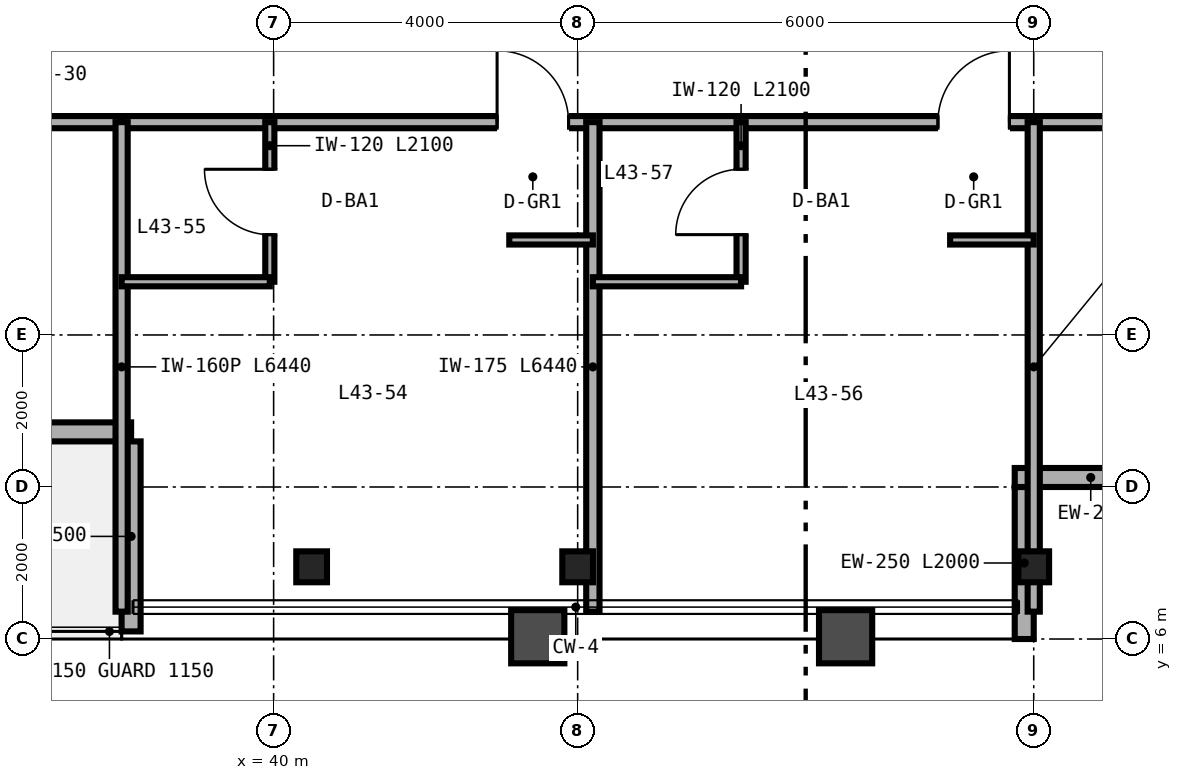
"""IFC4 building model, lengths in metres.
Left out: names, types, materials, properties, quantities, classifications, styles, units other than length and angle.
Written with IfcOpenShell. Run it as: python <this file> out.ifc"""

import sys

from ifc_helpers import new_model, si_unit, direction, frame, frame_2d, origin, origin_2d, place, context, subcontext, project, spatial, rectangle, i_section, extrude, source, transform, mapped, element, fill, save


model = new_model("IFC4")
c1 = context("Model", 3, precision=1e-05, world=origin(), true_north=direction((0.0, 1.0)))
c2 = subcontext(c1, "Body", "Model", "MODEL_VIEW")
j1 = project(units=[si_unit("LENGTHUNIT", "METRE"), si_unit("PLANEANGLEUNIT", "RADIAN")], contexts=[c1])
p1 = place(None, origin())
s1 = spatial("IfcSite", under=j1, at=p1, CompositionType="ELEMENT")
p2 = place(p1, origin())
s2 = spatial("IfcBuilding", under=s1, at=p2, CompositionType="ELEMENT")
p3 = place(p2, frame((0.0, 0.0, 174.0)))
s3 = spatial("IfcBuildingStorey", under=s2, at=p3, CompositionType="ELEMENT", Elevation=174.0)
m1 = source(origin(), c2, "Body", "SweptSolid", [
    extrude(i_section(OverallWidth=0.404, OverallDepth=0.407, WebThickness=0.027, FlangeThickness=0.044, FilletRadius=0.025, at=origin_2d()), origin(), (0.0, 0.0, 1.0), 3.37),
])
for number, where, z_axis, x_axis in (
    (1, (40.5, 6.95, 0.0), (0.0, 0.0, 1.0), (1.0, 0.0, 0.0)),
    (2, (44.0, 6.95, 0.0), (0.0, 0.0, 1.0), (1.0, 0.0, 0.0)),
    (3, (50.0, 6.95, 0.0), (0.0, 0.0, 1.0), (1.0, 0.0, 0.0)),
):
    element("IfcColumn", number, at=place(p3, frame(where, z_axis=z_axis, x_axis=x_axis)), inside=s3, PredefinedType="COLUMN", context=c2, shape_type="MappedRepresentation", body=[
        mapped(m1, transform((0.0, 0.0, 0.0), scale=1.0)),
    ])
p4 = place(p3, frame((49.875, 6.0, 0.0), z_axis=(0.0, 0.0, 1.0), x_axis=(0.0, 1.0, 0.0)))
e4 = element("IfcWall", 4, at=p4, inside=s3, PredefinedType="SOLIDWALL", context=c2, shape_type="SweptSolid", body=[
    extrude(rectangle(XDim=2.0, YDim=0.25, at=frame_2d((1.0, 0.0))), origin(), (0.0, 0.0, 1.0), 2.677),
])
p5 = place(p3, frame((49.75, 8.125, 0.0), z_axis=(0.0, 0.0, 1.0), x_axis=(1.0, 0.0, 0.0)))
e5 = element("IfcWall", 5, at=p5, inside=s3, PredefinedType="SOLIDWALL", context=c2, shape_type="SweptSolid", body=[
    extrude(rectangle(XDim=2.0, YDim=0.25, at=frame_2d((1.0, 0.0))), origin(), (0.0, 0.0, 1.0), 3.37),
])
p6 = place(p3, frame((25.875, 8.725, 0.0), z_axis=(0.0, 0.0, 1.0), x_axis=(1.0, 0.0, 0.0)))
e6 = element("IfcWall", 6, at=p6, inside=s3, PredefinedType="SOLIDWALL", context=c2, shape_type="SweptSolid", body=[
    extrude(rectangle(XDim=12.25, YDim=0.25, at=frame_2d((6.125, 0.0))), origin(), (0.0, 0.0, 1.0), 3.37),
])
p7 = place(p6, frame((5.6, 0.0, 0.0)))
e7 = element("IfcOpeningElement", 7, at=p7, cuts=e6, PredefinedType="OPENING", context=c2, shape_type="SweptSolid", body=[
    extrude(rectangle(XDim=1.05, YDim=2.15, at=frame_2d((0.525, 1.075))), frame((0.0, 0.135, 0.0), z_axis=(0.0, -1.0, 0.0), x_axis=(1.0, 0.0, 0.0)), (0.0, 0.0, 1.0), 0.27),
])
p8 = place(p3, frame((38.125, 6.1, 0.0), z_axis=(0.0, 0.0, 1.0), x_axis=(0.0, 1.0, 0.0)))
e8 = element("IfcWall", 8, at=p8, inside=s3, PredefinedType="SOLIDWALL", context=c2, shape_type="SweptSolid", body=[
    extrude(rectangle(XDim=2.5, YDim=0.25, at=frame_2d((1.25, 0.0))), origin(), (0.0, 0.0, 1.0), 2.443),
])
p9 = place(p3, frame((50.0, 12.8, 0.0), z_axis=(0.0, 0.0, 1.0), x_axis=(1.0, 0.0, 0.0)))
e9 = element("IfcWall", 9, at=p9, inside=s3, PredefinedType="PARTITIONING", context=c2, shape_type="SweptSolid", body=[
    extrude(rectangle(XDim=4.0, YDim=0.16, at=frame_2d((2.0, 0.0))), origin(), (0.0, 0.0, 1.0), 3.37),
])
p10 = place(p9, frame((1.52, 0.0, 0.0)))
e10 = element("IfcOpeningElement", 10, at=p10, cuts=e9, PredefinedType="OPENING", context=c2, shape_type="SweptSolid", body=[
    extrude(rectangle(XDim=0.96, YDim=2.15, at=frame_2d((0.48, 1.075))), frame((0.0, 0.09, 0.0), z_axis=(0.0, -1.0, 0.0), x_axis=(1.0, 0.0, 0.0)), (0.0, 0.0, 1.0), 0.18),
])
p11 = place(p3, frame((26.0, 12.8, 0.0), z_axis=(0.0, 0.0, 1.0), x_axis=(1.0, 0.0, 0.0)))
e11 = element("IfcWall", 11, at=p11, inside=s3, PredefinedType="PARTITIONING", context=c2, shape_type="SweptSolid", body=[
    extrude(rectangle(XDim=12.0, YDim=0.16, at=frame_2d((6.0, 0.0))), origin(), (0.0, 0.0, 1.0), 3.37),
])
p12 = place(p11, frame((5.2, 0.0, 0.0)))
e12 = element("IfcOpeningElement", 12, at=p12, cuts=e11, PredefinedType="OPENING", context=c2, shape_type="SweptSolid", body=[
    extrude(rectangle(XDim=0.96, YDim=2.15, at=frame_2d((0.48, 1.075))), frame((0.0, 0.09, 0.0), z_axis=(0.0, -1.0, 0.0), x_axis=(1.0, 0.0, 0.0)), (0.0, 0.0, 1.0), 0.18),
])
p13 = place(p3, frame((38.0, 12.8, 0.0), z_axis=(0.0, 0.0, 1.0), x_axis=(1.0, 0.0, 0.0)))
e13 = element("IfcWall", 13, at=p13, inside=s3, PredefinedType="PARTITIONING", context=c2, shape_type="SweptSolid", body=[
    extrude(rectangle(XDim=12.0, YDim=0.16, at=frame_2d((6.0, 0.0))), origin(), (0.0, 0.0, 1.0), 2.913),
])
p14 = place(p13, frame((4.94, 0.0, 0.0)))
e14 = element("IfcOpeningElement", 14, at=p14, cuts=e13, PredefinedType="OPENING", context=c2, shape_type="SweptSolid", body=[
    extrude(rectangle(XDim=0.94, YDim=2.15, at=frame_2d((0.47, 1.075))), frame((0.0, 0.09, 0.0), z_axis=(0.0, -1.0, 0.0), x_axis=(1.0, 0.0, 0.0)), (0.0, 0.0, 1.0), 0.18),
])
p15 = place(p13, frame((10.74, 0.0, 0.0)))
e15 = element("IfcOpeningElement", 15, at=p15, cuts=e13, PredefinedType="OPENING", context=c2, shape_type="SweptSolid", body=[
    extrude(rectangle(XDim=0.94, YDim=2.15, at=frame_2d((0.47, 1.075))), frame((0.0, 0.09, 0.0), z_axis=(0.0, -1.0, 0.0), x_axis=(1.0, 0.0, 0.0)), (0.0, 0.0, 1.0), 0.18),
])
p16 = place(p3, frame((38.0, 6.36, 0.0), z_axis=(0.0, 0.0, 1.0), x_axis=(0.0, 1.0, 0.0)))
e16 = element("IfcWall", 16, at=p16, inside=s3, PredefinedType="PARTITIONING", context=c2, shape_type="SweptSolid", body=[
    extrude(rectangle(XDim=6.44, YDim=0.16, at=frame_2d((3.22, 0.0))), origin(), (0.0, 0.0, 1.0), 2.443),
])
p17 = place(p3, frame((50.0, 6.36, 0.0), z_axis=(0.0, 0.0, 1.0), x_axis=(0.0, 1.0, 0.0)))
e17 = element("IfcWall", 17, at=p17, inside=s3, PredefinedType="PARTITIONING", context=c2, shape_type="SweptSolid", body=[
    extrude(rectangle(XDim=6.44, YDim=0.16, at=frame_2d((3.22, 0.0))), origin(), (0.0, 0.0, 1.0), 2.677),
])
p18 = place(p3, frame((44.2, 6.36, 0.0), z_axis=(0.0, 0.0, 1.0), x_axis=(0.0, 1.0, 0.0)))
e18 = element("IfcWall", 18, at=p18, inside=s3, PredefinedType="PARTITIONING", context=c2, shape_type="SweptSolid", body=[
    extrude(rectangle(XDim=6.44, YDim=0.175, at=frame_2d((3.22, 0.0))), origin(), (0.0, 0.0, 1.0), 2.677),
])
p19 = place(p3, frame((39.95, 10.7, 0.0), z_axis=(0.0, 0.0, 1.0), x_axis=(0.0, 1.0, 0.0)))
e19 = element("IfcWall", 19, at=p19, inside=s3, PredefinedType="PARTITIONING", context=c2, shape_type="SweptSolid", body=[
    extrude(rectangle(XDim=2.1, YDim=0.12, at=frame_2d((1.05, 0.0))), origin(), (0.0, 0.0, 1.0), 3.37),
])
p20 = place(p19, frame((0.62, 0.0, 0.0)))
e20 = element("IfcOpeningElement", 20, at=p20, cuts=e19, PredefinedType="OPENING", context=c2, shape_type="SweptSolid", body=[
    extrude(rectangle(XDim=0.86, YDim=2.1, at=frame_2d((0.43, 1.05))), frame((0.0, 0.07, 0.0), z_axis=(0.0, -1.0, 0.0), x_axis=(1.0, 0.0, 0.0)), (0.0, 0.0, 1.0), 0.14),
])
p21 = place(p3, frame((38.0, 10.7, 0.0), z_axis=(0.0, 0.0, 1.0), x_axis=(1.0, 0.0, 0.0)))
e21 = element("IfcWall", 21, at=p21, inside=s3, PredefinedType="PARTITIONING", context=c2, shape_type="SweptSolid", body=[
    extrude(rectangle(XDim=1.95, YDim=0.12, at=frame_2d((0.975, 0.0))), origin(), (0.0, 0.0, 1.0), 3.37),
])
p22 = place(p3, frame((43.1, 11.25, 0.0), z_axis=(0.0, 0.0, 1.0), x_axis=(1.0, 0.0, 0.0)))
e22 = element("IfcWall", 22, at=p22, inside=s3, PredefinedType="PARTITIONING", context=c2, shape_type="SweptSolid", body=[
    extrude(rectangle(XDim=1.1, YDim=0.12, at=frame_2d((0.55, 0.0))), origin(), (0.0, 0.0, 1.0), 3.37),
])
p23 = place(p3, frame((46.15, 10.7, 0.0), z_axis=(0.0, 0.0, 1.0), x_axis=(0.0, 1.0, 0.0)))
e23 = element("IfcWall", 23, at=p23, inside=s3, PredefinedType="PARTITIONING", context=c2, shape_type="SweptSolid", body=[
    extrude(rectangle(XDim=2.1, YDim=0.12, at=frame_2d((1.05, 0.0))), origin(), (0.0, 0.0, 1.0), 3.37),
])
p24 = place(p23, frame((0.62, 0.0, 0.0)))
e24 = element("IfcOpeningElement", 24, at=p24, cuts=e23, PredefinedType="OPENING", context=c2, shape_type="SweptSolid", body=[
    extrude(rectangle(XDim=0.86, YDim=2.1, at=frame_2d((0.43, 1.05))), frame((0.0, 0.07, 0.0), z_axis=(0.0, -1.0, 0.0), x_axis=(1.0, 0.0, 0.0)), (0.0, 0.0, 1.0), 0.14),
])
p25 = place(p3, frame((44.2, 10.7, 0.0), z_axis=(0.0, 0.0, 1.0), x_axis=(1.0, 0.0, 0.0)))
e25 = element("IfcWall", 25, at=p25, inside=s3, PredefinedType="PARTITIONING", context=c2, shape_type="SweptSolid", body=[
    extrude(rectangle(XDim=1.95, YDim=0.12, at=frame_2d((0.975, 0.0))), origin(), (0.0, 0.0, 1.0), 3.37),
])
p26 = place(p3, frame((48.9, 11.25, 0.0), z_axis=(0.0, 0.0, 1.0), x_axis=(1.0, 0.0, 0.0)))
e26 = element("IfcWall", 26, at=p26, inside=s3, PredefinedType="PARTITIONING", context=c2, shape_type="SweptSolid", body=[
    extrude(rectangle(XDim=1.1, YDim=0.12, at=frame_2d((0.55, 0.0))), origin(), (0.0, 0.0, 1.0), 3.37),
])
m2 = source(origin(), c2, "Body", "SweptSolid", [
    extrude(rectangle(XDim=0.86, YDim=2.1, at=frame_2d((0.43, 1.05))), frame((0.0, 0.025, 0.0), z_axis=(0.0, -1.0, 0.0), x_axis=(1.0, 0.0, 0.0)), (0.0, 0.0, 1.0), 0.05),
])
p27 = place(p20, origin())
e27 = element("IfcDoor", 27, at=p27, inside=s3, OperationType="SINGLE_SWING_RIGHT", PredefinedType="DOOR", context=c2, shape_type="MappedRepresentation", body=[
    mapped(m2, transform((0.0, 0.0, 0.0), scale=1.0)),
])
fill(e20, e27)
p28 = place(p24, origin())
e28 = element("IfcDoor", 28, at=p28, inside=s3, OperationType="SINGLE_SWING_LEFT", PredefinedType="DOOR", context=c2, shape_type="MappedRepresentation", body=[
    mapped(m2, transform((0.0, 0.0, 0.0), scale=1.0)),
])
fill(e24, e28)
m3 = source(origin(), c2, "Body", "SweptSolid", [
    extrude(rectangle(XDim=0.94, YDim=2.15, at=frame_2d((0.47, 1.075))), frame((0.0, 0.025, 0.0), z_axis=(0.0, -1.0, 0.0), x_axis=(1.0, 0.0, 0.0)), (0.0, 0.0, 1.0), 0.05),
])
p29 = place(p14, origin())
e29 = element("IfcDoor", 29, at=p29, inside=s3, OperationType="SINGLE_SWING_LEFT", PredefinedType="DOOR", context=c2, shape_type="MappedRepresentation", body=[
    mapped(m3, transform((0.0, 0.0, 0.0), scale=1.0)),
])
fill(e14, e29)
p30 = place(p15, origin())
e30 = element("IfcDoor", 30, at=p30, inside=s3, OperationType="SINGLE_SWING_RIGHT", PredefinedType="DOOR", context=c2, shape_type="MappedRepresentation", body=[
    mapped(m3, transform((0.0, 0.0, 0.0), scale=1.0)),
])
fill(e15, e30)
save(model, sys.argv[1])
